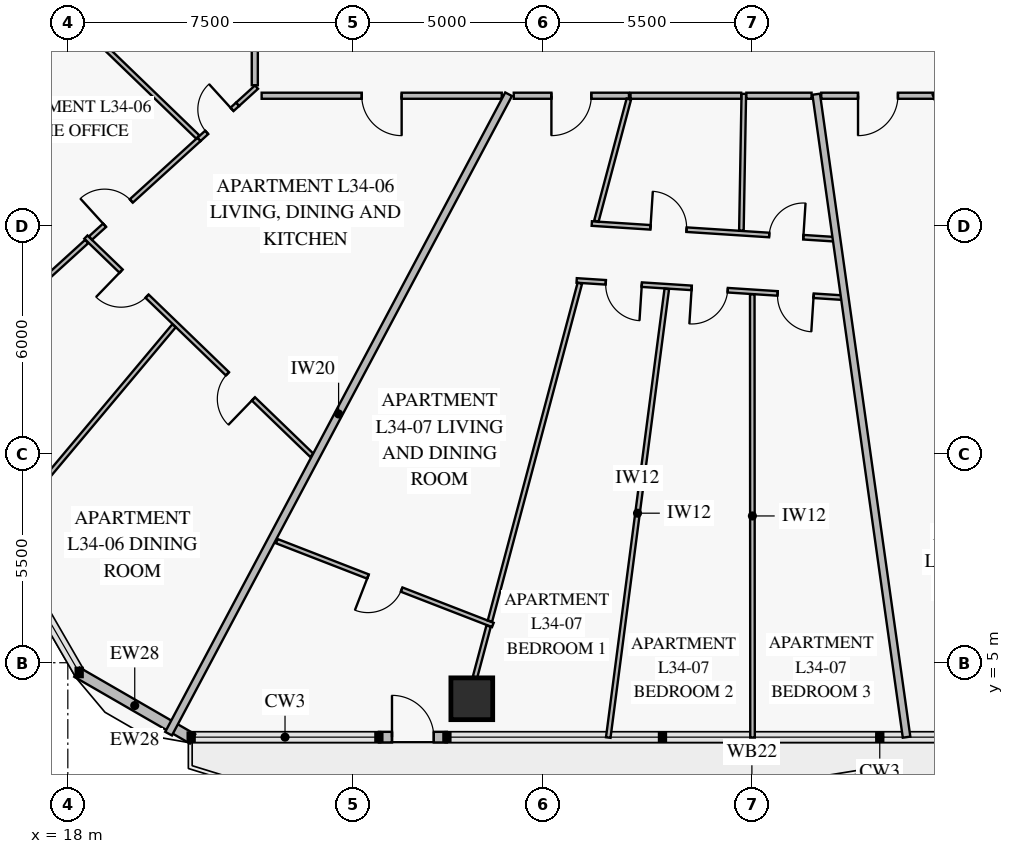
"""IFC4 building model, lengths in metres.
Left out: names, types, materials, properties, quantities, classifications, styles, units other than length and angle.
Written with IfcOpenShell. Run it as: python <this file> out.ifc"""

import sys

from ifc_helpers import new_model, si_unit, direction, frame, frame_2d, origin, origin_2d, place, context, subcontext, project, spatial, rectangle, extrude, element, fill, save


model = new_model("IFC4")
c1 = context("Model", 3, precision=1e-05, world=origin(), true_north=direction((0.0, 1.0)))
c2 = subcontext(c1, "Body", "Model", "MODEL_VIEW")
j1 = project(units=[si_unit("LENGTHUNIT", "METRE"), si_unit("PLANEANGLEUNIT", "RADIAN")], contexts=[c1])
p1 = place(None, origin())
s1 = spatial("IfcSite", under=j1, at=p1, CompositionType="ELEMENT")
p2 = place(p1, origin())
s2 = spatial("IfcBuilding", under=s1, at=p2, CompositionType="ELEMENT")
p3 = place(p2, frame((0.0, 0.0, 138.0)))
s3 = spatial("IfcBuildingStorey", under=s2, at=p3, CompositionType="ELEMENT", Elevation=138.0)
p4 = place(p3, frame((28.63, 4.052, 0.0), z_axis=(0.0, 0.0, 1.0), x_axis=(1.0, 0.0, 0.0)))
e1 = element("IfcColumn", 1, at=p4, inside=s3, PredefinedType="COLUMN", context=c2, shape_type="SweptSolid", body=[
    extrude(rectangle(XDim=1.1, YDim=1.1, at=origin_2d()), origin(), (0.0, 0.0, 1.0), 3.55),
])
p5 = place(p3, frame((27.975, 3.042, 0.0), z_axis=(0.0, 0.0, 1.0), x_axis=(-1.0, 0.0, 0.0)))
e2 = element("IfcWall", 2, at=p5, inside=s3, PredefinedType="SOLIDWALL", context=c2, shape_type="SweptSolid", body=[
    extrude(rectangle(XDim=1.79, YDim=0.28, at=frame_2d((0.895, 0.0))), origin(), (0.0, 0.0, 1.0), 3.55),
])
p6 = place(p5, frame((0.345, 0.0, 0.0)))
e3 = element("IfcOpeningElement", 3, at=p6, cuts=e2, PredefinedType="OPENING", context=c2, shape_type="SweptSolid", body=[
    extrude(rectangle(XDim=1.1, YDim=2.2, at=frame_2d((0.55, 1.1))), frame((0.0, 0.152, 0.0), z_axis=(0.0, -1.0, 0.0), x_axis=(1.0, 0.0, 0.0)), (0.0, 0.0, 1.0), 0.304),
])
p7 = place(p3, frame((21.283, 2.994, 0.0), z_axis=(0.0, 0.0, 1.0), x_axis=(-0.866007452331, 0.500031091541, 0.0)))
e4 = element("IfcWall", 4, at=p7, inside=s3, PredefinedType="SOLIDWALL", context=c2, shape_type="SweptSolid", body=[
    extrude(rectangle(XDim=3.515, YDim=0.28, at=frame_2d((1.757, 0.0))), origin(), (0.0, 0.0, 1.0), 3.55),
])
p8 = place(p3, frame((18.475, 16.2, 0.0), z_axis=(0.0, 0.0, 1.0), x_axis=(0.719335270824, -0.694663060878, 0.0)))
e5 = element("IfcWall", 5, at=p8, inside=s3, PredefinedType="PARTITIONING", context=c2, shape_type="SweptSolid", body=[
    extrude(rectangle(XDim=8.263, YDim=0.12, at=frame_2d((4.131, 0.0))), origin(), (0.0, 0.0, 1.0), 2.85),
])
p9 = place(p8, frame((1.288, 0.0, 0.0)))
e6 = element("IfcOpeningElement", 6, at=p9, cuts=e5, PredefinedType="OPENING", context=c2, shape_type="SweptSolid", body=[
    extrude(rectangle(XDim=0.95, YDim=2.1, at=frame_2d((0.475, 1.05))), frame((0.0, 0.072, 0.0), z_axis=(0.0, -1.0, 0.0), x_axis=(1.0, 0.0, 0.0)), (0.0, 0.0, 1.0), 0.144),
])
p10 = place(p8, frame((5.179, 0.0, 0.0)))
e7 = element("IfcOpeningElement", 7, at=p10, cuts=e5, PredefinedType="OPENING", context=c2, shape_type="SweptSolid", body=[
    extrude(rectangle(XDim=0.95, YDim=2.1, at=frame_2d((0.475, 1.05))), frame((0.0, 0.072, 0.0), z_axis=(0.0, -1.0, 0.0), x_axis=(1.0, 0.0, 0.0)), (0.0, 0.0, 1.0), 0.144),
])
p11 = place(p3, frame((22.469, 19.696, 0.0), z_axis=(0.0, 0.0, 1.0), x_axis=(-0.739835725611, -0.672787558677, 0.0)))
e8 = element("IfcWall", 8, at=p11, inside=s3, PredefinedType="PARTITIONING", context=c2, shape_type="SweptSolid", body=[
    extrude(rectangle(XDim=1.376, YDim=0.12, at=frame_2d((0.688, 0.0))), origin(), (0.0, 0.0, 1.0), 3.55),
])
p12 = place(p11, frame((0.2, 0.0, 0.0)))
e9 = element("IfcOpeningElement", 9, at=p12, cuts=e8, PredefinedType="OPENING", context=c2, shape_type="SweptSolid", body=[
    extrude(rectangle(XDim=0.9, YDim=2.1, at=frame_2d((0.45, 1.05))), frame((0.0, 0.072, 0.0), z_axis=(0.0, -1.0, 0.0), x_axis=(1.0, 0.0, 0.0)), (0.0, 0.0, 1.0), 0.144),
])
p13 = place(p3, frame((21.45, 18.77, 0.0), z_axis=(0.0, 0.0, 1.0), x_axis=(-0.739899959551, -0.672716916583, 0.0)))
e10 = element("IfcWall", 10, at=p13, inside=s3, PredefinedType="PARTITIONING", context=c2, shape_type="SweptSolid", body=[
    extrude(rectangle(XDim=3.856, YDim=0.12, at=frame_2d((1.928, 0.0))), origin(), (0.0, 0.0, 1.0), 3.1),
])
p14 = place(p13, frame((2.406, 0.0, 0.0)))
e11 = element("IfcOpeningElement", 11, at=p14, cuts=e10, PredefinedType="OPENING", context=c2, shape_type="SweptSolid", body=[
    extrude(rectangle(XDim=0.95, YDim=2.1, at=frame_2d((0.475, 1.05))), frame((0.0, 0.072, 0.0), z_axis=(0.0, -1.0, 0.0), x_axis=(1.0, 0.0, 0.0)), (0.0, 0.0, 1.0), 0.144),
])
p15 = place(p3, frame((18.497, 16.084, 0.0), z_axis=(0.0, 0.0, 1.0), x_axis=(-0.739855068129, -0.672766287922, 0.0)))
e12 = element("IfcWall", 12, at=p15, inside=s3, PredefinedType="PARTITIONING", context=c2, shape_type="SweptSolid", body=[
    extrude(rectangle(XDim=1.82, YDim=0.12, at=frame_2d((0.91, 0.0))), origin(), (0.0, 0.0, 1.0), 3.55),
])
p16 = place(p3, frame((23.1, 19.92, 0.0), z_axis=(0.0, 0.0, 1.0), x_axis=(1.0, 0.0, 0.0)))
e13 = element("IfcWall", 13, at=p16, inside=s3, PredefinedType="PARTITIONING", context=c2, shape_type="SweptSolid", body=[
    extrude(rectangle(XDim=6.318, YDim=0.16, at=frame_2d((3.159, 0.0))), origin(), (0.0, 0.0, 1.0), 2.85),
])
p17 = place(p16, frame((2.634, 0.0, 0.0)))
e14 = element("IfcOpeningElement", 14, at=p17, cuts=e13, PredefinedType="OPENING", context=c2, shape_type="SweptSolid", body=[
    extrude(rectangle(XDim=1.05, YDim=2.15, at=frame_2d((0.525, 1.075))), frame((0.0, 0.092, 0.0), z_axis=(0.0, -1.0, 0.0), x_axis=(1.0, 0.0, 0.0)), (0.0, 0.0, 1.0), 0.184),
])
p18 = place(p3, frame((23.498, 8.199, 0.0), z_axis=(0.0, 0.0, 1.0), x_axis=(0.932323578893, -0.361625143262, 0.0)))
e15 = element("IfcWall", 15, at=p18, inside=s3, PredefinedType="PARTITIONING", context=c2, shape_type="SweptSolid", body=[
    extrude(rectangle(XDim=6.099, YDim=0.12, at=frame_2d((3.05, 0.0))), origin(), (0.0, 0.0, 1.0), 2.85),
])
p19 = place(p18, frame((2.574, 0.0, 0.0)))
e16 = element("IfcOpeningElement", 16, at=p19, cuts=e15, PredefinedType="OPENING", context=c2, shape_type="SweptSolid", body=[
    extrude(rectangle(XDim=0.95, YDim=2.1, at=frame_2d((0.475, 1.05))), frame((0.0, 0.072, 0.0), z_axis=(0.0, -1.0, 0.0), x_axis=(1.0, 0.0, 0.0)), (0.0, 0.0, 1.0), 0.144),
])
p20 = place(p3, frame((31.788, 16.557, 0.0), z_axis=(0.0, 0.0, 1.0), x_axis=(0.997916701545, -0.064515554547, 0.0)))
e17 = element("IfcWall", 17, at=p20, inside=s3, PredefinedType="PARTITIONING", context=c2, shape_type="SweptSolid", body=[
    extrude(rectangle(XDim=6.414, YDim=0.12, at=frame_2d((3.207, 0.0))), origin(), (0.0, 0.0, 1.0), 2.85),
])
p21 = place(p20, frame((1.548, 0.0, 0.0)))
e18 = element("IfcOpeningElement", 18, at=p21, cuts=e17, PredefinedType="OPENING", context=c2, shape_type="SweptSolid", body=[
    extrude(rectangle(XDim=0.95, YDim=2.1, at=frame_2d((0.475, 1.05))), frame((0.0, 0.072, 0.0), z_axis=(0.0, -1.0, 0.0), x_axis=(1.0, 0.0, 0.0)), (0.0, 0.0, 1.0), 0.144),
])
p22 = place(p20, frame((4.678, 0.0, 0.0)))
e19 = element("IfcOpeningElement", 19, at=p22, cuts=e17, PredefinedType="OPENING", context=c2, shape_type="SweptSolid", body=[
    extrude(rectangle(XDim=0.9, YDim=2.1, at=frame_2d((0.45, 1.05))), frame((0.0, 0.072, 0.0), z_axis=(0.0, -1.0, 0.0), x_axis=(1.0, 0.0, 0.0)), (0.0, 0.0, 1.0), 0.144),
])
p23 = place(p3, frame((31.389, 15.06, 0.0), z_axis=(0.0, 0.0, 1.0), x_axis=(0.997916790239, -0.064514182617, 0.0)))
e20 = element("IfcWall", 20, at=p23, inside=s3, PredefinedType="PARTITIONING", context=c2, shape_type="SweptSolid", body=[
    extrude(rectangle(XDim=7.016, YDim=0.12, at=frame_2d((3.508, 0.0))), origin(), (0.0, 0.0, 1.0), 2.85),
])
p24 = place(p23, frame((0.768, 0.0, 0.0)))
e21 = element("IfcOpeningElement", 21, at=p24, cuts=e20, PredefinedType="OPENING", context=c2, shape_type="SweptSolid", body=[
    extrude(rectangle(XDim=0.95, YDim=2.1, at=frame_2d((0.475, 1.05))), frame((0.0, 0.072, 0.0), z_axis=(0.0, -1.0, 0.0), x_axis=(1.0, 0.0, 0.0)), (0.0, 0.0, 1.0), 0.144),
])
p25 = place(p23, frame((3.033, 0.0, 0.0)))
e22 = element("IfcOpeningElement", 22, at=p25, cuts=e20, PredefinedType="OPENING", context=c2, shape_type="SweptSolid", body=[
    extrude(rectangle(XDim=0.95, YDim=2.1, at=frame_2d((0.475, 1.05))), frame((0.0, 0.072, 0.0), z_axis=(0.0, -1.0, 0.0), x_axis=(1.0, 0.0, 0.0)), (0.0, 0.0, 1.0), 0.144),
])
p26 = place(p23, frame((5.298, 0.0, 0.0)))
e23 = element("IfcOpeningElement", 23, at=p26, cuts=e20, PredefinedType="OPENING", context=c2, shape_type="SweptSolid", body=[
    extrude(rectangle(XDim=0.95, YDim=2.1, at=frame_2d((0.475, 1.05))), frame((0.0, 0.072, 0.0), z_axis=(0.0, -1.0, 0.0), x_axis=(1.0, 0.0, 0.0)), (0.0, 0.0, 1.0), 0.144),
])
p27 = place(p3, frame((29.734, 19.92, 0.0), z_axis=(0.0, 0.0, 1.0), x_axis=(1.0, 0.0, 0.0)))
e24 = element("IfcWall", 24, at=p27, inside=s3, PredefinedType="PARTITIONING", context=c2, shape_type="SweptSolid", body=[
    extrude(rectangle(XDim=3.031, YDim=0.16, at=frame_2d((1.516, 0.0))), origin(), (0.0, 0.0, 1.0), 2.85),
])
p28 = place(p27, frame((0.99, 0.0, 0.0)))
e25 = element("IfcOpeningElement", 25, at=p28, cuts=e24, PredefinedType="OPENING", context=c2, shape_type="SweptSolid", body=[
    extrude(rectangle(XDim=1.05, YDim=2.15, at=frame_2d((0.525, 1.075))), frame((0.0, 0.092, 0.0), z_axis=(0.0, -1.0, 0.0), x_axis=(1.0, 0.0, 0.0)), (0.0, 0.0, 1.0), 0.184),
])
p29 = place(p3, frame((37.826, 19.92, 0.0), z_axis=(0.0, 0.0, 1.0), x_axis=(1.0, 0.0, 0.0)))
e26 = element("IfcWall", 26, at=p29, inside=s3, PredefinedType="PARTITIONING", context=c2, shape_type="SweptSolid", body=[
    extrude(rectangle(XDim=2.984, YDim=0.16, at=frame_2d((1.492, 0.0))), origin(), (0.0, 0.0, 1.0), 2.85),
])
p30 = place(p29, frame((0.967, 0.0, 0.0)))
e27 = element("IfcOpeningElement", 27, at=p30, cuts=e26, PredefinedType="OPENING", context=c2, shape_type="SweptSolid", body=[
    extrude(rectangle(XDim=1.05, YDim=2.15, at=frame_2d((0.525, 1.075))), frame((0.0, 0.092, 0.0), z_axis=(0.0, -1.0, 0.0), x_axis=(1.0, 0.0, 0.0)), (0.0, 0.0, 1.0), 0.184),
])
p31 = place(p3, frame((22.96, 24.471, 0.0), z_axis=(0.0, 0.0, 1.0), x_axis=(-0.866023267778, -0.500003699654, 0.0)))
e28 = element("IfcWall", 28, at=p31, inside=s3, PredefinedType="PARTITIONING", context=c2, shape_type="SweptSolid", body=[
    extrude(rectangle(XDim=13.901, YDim=0.2, at=frame_2d((6.951, 0.0))), origin(), (0.0, 0.0, 1.0), 2.8),
])
p32 = place(p3, frame((20.794, 13.866, 0.0), z_axis=(0.0, 0.0, 1.0), x_axis=(-0.642520269692, -0.766268688539, 0.0)))
e29 = element("IfcWall", 29, at=p32, inside=s3, PredefinedType="PARTITIONING", context=c2, shape_type="SweptSolid", body=[
    extrude(rectangle(XDim=7.187, YDim=0.12, at=frame_2d((3.594, 0.0))), origin(), (0.0, 0.0, 1.0), 2.8),
])
p33 = place(p3, frame((22.965, 20.147, 0.0), z_axis=(0.0, 0.0, 1.0), x_axis=(-0.739791864243, -0.67283578799, 0.0)))
e30 = element("IfcWall", 30, at=p33, inside=s3, PredefinedType="PARTITIONING", context=c2, shape_type="SweptSolid", body=[
    extrude(rectangle(XDim=0.671, YDim=0.12, at=frame_2d((0.335, 0.0))), origin(), (0.0, 0.0, 1.0), 3.55),
])
p34 = place(p3, frame((18.424, 21.728, 0.0), z_axis=(0.0, 0.0, 1.0), x_axis=(0.719336822734, -0.694661453845, 0.0)))
e31 = element("IfcWall", 31, at=p34, inside=s3, PredefinedType="PARTITIONING", context=c2, shape_type="SweptSolid", body=[
    extrude(rectangle(XDim=4.166, YDim=0.12, at=frame_2d((2.083, 0.0))), origin(), (0.0, 0.0, 1.0), 3.55),
])
p35 = place(p3, frame((29.598, 19.96, 0.0), z_axis=(0.0, 0.0, 1.0), x_axis=(-0.469467427619, -0.882949791554, 0.0)))
e32 = element("IfcWall", 32, at=p35, inside=s3, PredefinedType="PARTITIONING", context=c2, shape_type="SweptSolid", body=[
    extrude(rectangle(XDim=19.057, YDim=0.2, at=frame_2d((9.528, 0.0))), origin(), (0.0, 0.0, 1.0), 2.8),
])
p36 = place(p3, frame((35.788, 19.97, 0.0), z_axis=(0.0, 0.0, 1.0), x_axis=(-0.017701743617, -0.999843311861, 0.0)))
e33 = element("IfcWall", 33, at=p36, inside=s3, PredefinedType="PARTITIONING", context=c2, shape_type="SweptSolid", body=[
    extrude(rectangle(XDim=3.6, YDim=0.12, at=frame_2d((1.8, 0.0))), origin(), (0.0, 0.0, 1.0), 3.55),
])
p37 = place(p3, frame((33.761, 14.838, 0.0), z_axis=(0.0, 0.0, 1.0), x_axis=(-0.129380382559, -0.9915950366, 0.0)))
e34 = element("IfcWall", 34, at=p37, inside=s3, PredefinedType="PARTITIONING", context=c2, shape_type="SweptSolid", body=[
    extrude(rectangle(XDim=11.907, YDim=0.12, at=frame_2d((5.954, 0.0))), origin(), (0.0, 0.0, 1.0), 2.8),
])
p38 = place(p3, frame((36.01, 14.693, 0.0), z_axis=(0.0, 0.0, 1.0), x_axis=(0.000586203186, -0.999999828183, 0.0)))
e35 = element("IfcWall", 35, at=p38, inside=s3, PredefinedType="PARTITIONING", context=c2, shape_type="SweptSolid", body=[
    extrude(rectangle(XDim=11.661, YDim=0.12, at=frame_2d((5.831, 0.0))), origin(), (0.0, 0.0, 1.0), 2.8),
])
p39 = place(p3, frame((32.762, 19.832, 0.0), z_axis=(0.0, 0.0, 1.0), x_axis=(-0.257187510329, -0.966361518548, 0.0)))
e36 = element("IfcWall", 36, at=p39, inside=s3, PredefinedType="PARTITIONING", context=c2, shape_type="SweptSolid", body=[
    extrude(rectangle(XDim=3.326, YDim=0.12, at=frame_2d((1.663, 0.0))), origin(), (0.0, 0.0, 1.0), 2.85),
])
p40 = place(p3, frame((31.473, 14.986, 0.0), z_axis=(0.0, 0.0, 1.0), x_axis=(-0.257120794916, -0.966379271726, 0.0)))
e37 = element("IfcWall", 37, at=p40, inside=s3, PredefinedType="PARTITIONING", context=c2, shape_type="SweptSolid", body=[
    extrude(rectangle(XDim=9.199, YDim=0.12, at=frame_2d((4.6, 0.0))), origin(), (0.0, 0.0, 1.0), 2.85),
])
p41 = place(p3, frame((29.073, 5.964, 0.0), z_axis=(0.0, 0.0, 1.0), x_axis=(-0.257268877058, -0.966339859934, 0.0)))
e38 = element("IfcWall", 38, at=p41, inside=s3, PredefinedType="PARTITIONING", context=c2, shape_type="SweptSolid", body=[
    extrude(rectangle(XDim=1.389, YDim=0.12, at=frame_2d((0.695, 0.0))), origin(), (0.0, 0.0, 1.0), 2.85),
])
p42 = place(p3, frame((37.692, 19.96, 0.0), z_axis=(0.0, 0.0, 1.0), x_axis=(0.139170315648, -0.990268460188, 0.0)))
e39 = element("IfcWall", 39, at=p42, inside=s3, PredefinedType="PARTITIONING", context=c2, shape_type="SweptSolid", body=[
    extrude(rectangle(XDim=17.085, YDim=0.2, at=frame_2d((8.542, 0.0))), origin(), (0.0, 0.0, 1.0), 2.8),
])
p43 = place(p3, frame((40.814, 19.963, 0.0), z_axis=(0.0, 0.0, 1.0), x_axis=(0.371581909809, -0.928400174657, 0.0)))
e40 = element("IfcWall", 40, at=p43, inside=s3, PredefinedType="PARTITIONING", context=c2, shape_type="SweptSolid", body=[
    extrude(rectangle(XDim=0.66, YDim=0.12, at=frame_2d((0.33, 0.0))), origin(), (0.0, 0.0, 1.0), 3.55),
])
p44 = place(p3, frame((22.92, 24.272, 0.0), z_axis=(0.0, 0.0, 1.0), x_axis=(0.0, -1.0, 0.0)))
e41 = element("IfcWall", 41, at=p44, inside=s3, PredefinedType="PARTITIONING", context=c2, shape_type="SweptSolid", body=[
    extrude(rectangle(XDim=4.075, YDim=0.16, at=frame_2d((2.038, 0.0))), origin(), (0.0, 0.0, 1.0), 3.55),
])
p45 = place(p3, frame((32.806, 19.92, 0.0), z_axis=(0.0, 0.0, 1.0), x_axis=(1.0, 0.0, 0.0)))
e42 = element("IfcWall", 42, at=p45, inside=s3, PredefinedType="PARTITIONING", context=c2, shape_type="SweptSolid", body=[
    extrude(rectangle(XDim=2.912, YDim=0.16, at=frame_2d((1.456, 0.0))), origin(), (0.0, 0.0, 1.0), 2.85),
])
p46 = place(p3, frame((35.854, 19.92, 0.0), z_axis=(0.0, 0.0, 1.0), x_axis=(1.0, 0.0, 0.0)))
e43 = element("IfcWall", 43, at=p46, inside=s3, PredefinedType="PARTITIONING", context=c2, shape_type="SweptSolid", body=[
    extrude(rectangle(XDim=1.716, YDim=0.16, at=frame_2d((0.858, 0.0))), origin(), (0.0, 0.0, 1.0), 3.55),
])
p47 = place(p6, frame((1.1, 0.0, 0.0), z_axis=(0.0, 0.0, 1.0), x_axis=(-1.0, 0.0, 0.0)))
e44 = element("IfcDoor", 44, at=p47, inside=s3, OperationType="SINGLE_SWING_LEFT", PredefinedType="DOOR", context=c2, shape_type="SweptSolid", body=[
    extrude(rectangle(XDim=1.1, YDim=2.2, at=frame_2d((0.55, 1.1))), frame((0.0, 0.025, 0.0), z_axis=(0.0, -1.0, 0.0), x_axis=(1.0, 0.0, 0.0)), (0.0, 0.0, 1.0), 0.05),
])
fill(e3, e44)
p48 = place(p9, frame((0.95, 0.0, 0.0), z_axis=(0.0, 0.0, 1.0), x_axis=(-1.0, 0.0, 0.0)))
e45 = element("IfcDoor", 45, at=p48, inside=s3, OperationType="SINGLE_SWING_RIGHT", PredefinedType="DOOR", context=c2, shape_type="SweptSolid", body=[
    extrude(rectangle(XDim=0.95, YDim=2.1, at=frame_2d((0.475, 1.05))), frame((0.0, 0.025, 0.0), z_axis=(0.0, -1.0, 0.0), x_axis=(1.0, 0.0, 0.0)), (0.0, 0.0, 1.0), 0.05),
])
fill(e6, e45)
p49 = place(p10, frame((0.95, 0.0, 0.0), z_axis=(0.0, 0.0, 1.0), x_axis=(-1.0, 0.0, 0.0)))
e46 = element("IfcDoor", 46, at=p49, inside=s3, OperationType="SINGLE_SWING_LEFT", PredefinedType="DOOR", context=c2, shape_type="SweptSolid", body=[
    extrude(rectangle(XDim=0.95, YDim=2.1, at=frame_2d((0.475, 1.05))), frame((0.0, 0.025, 0.0), z_axis=(0.0, -1.0, 0.0), x_axis=(1.0, 0.0, 0.0)), (0.0, 0.0, 1.0), 0.05),
])
fill(e7, e46)
p50 = place(p12, frame((0.9, 0.0, 0.0), z_axis=(0.0, 0.0, 1.0), x_axis=(-1.0, 0.0, 0.0)))
e47 = element("IfcDoor", 47, at=p50, inside=s3, OperationType="SINGLE_SWING_RIGHT", PredefinedType="DOOR", context=c2, shape_type="SweptSolid", body=[
    extrude(rectangle(XDim=0.9, YDim=2.1, at=frame_2d((0.45, 1.05))), frame((0.0, 0.025, 0.0), z_axis=(0.0, -1.0, 0.0), x_axis=(1.0, 0.0, 0.0)), (0.0, 0.0, 1.0), 0.05),
])
fill(e9, e47)
p51 = place(p14, frame((0.95, 0.0, 0.0), z_axis=(0.0, 0.0, 1.0), x_axis=(-1.0, 0.0, 0.0)))
e48 = element("IfcDoor", 48, at=p51, inside=s3, OperationType="SINGLE_SWING_LEFT", PredefinedType="DOOR", context=c2, shape_type="SweptSolid", body=[
    extrude(rectangle(XDim=0.95, YDim=2.1, at=frame_2d((0.475, 1.05))), frame((0.0, 0.025, 0.0), z_axis=(0.0, -1.0, 0.0), x_axis=(1.0, 0.0, 0.0)), (0.0, 0.0, 1.0), 0.05),
])
fill(e11, e48)
p52 = place(p17, frame((1.05, 0.0, 0.0), z_axis=(0.0, 0.0, 1.0), x_axis=(-1.0, 0.0, 0.0)))
e49 = element("IfcDoor", 49, at=p52, inside=s3, OperationType="SINGLE_SWING_LEFT", PredefinedType="DOOR", context=c2, shape_type="SweptSolid", body=[
    extrude(rectangle(XDim=1.05, YDim=2.15, at=frame_2d((0.525, 1.075))), frame((0.0, 0.025, 0.0), z_axis=(0.0, -1.0, 0.0), x_axis=(1.0, 0.0, 0.0)), (0.0, 0.0, 1.0), 0.05),
])
fill(e14, e49)
p53 = place(p19, frame((0.95, 0.0, 0.0), z_axis=(0.0, 0.0, 1.0), x_axis=(-1.0, 0.0, 0.0)))
e50 = element("IfcDoor", 50, at=p53, inside=s3, OperationType="SINGLE_SWING_RIGHT", PredefinedType="DOOR", context=c2, shape_type="SweptSolid", body=[
    extrude(rectangle(XDim=0.95, YDim=2.1, at=frame_2d((0.475, 1.05))), frame((0.0, 0.025, 0.0), z_axis=(0.0, -1.0, 0.0), x_axis=(1.0, 0.0, 0.0)), (0.0, 0.0, 1.0), 0.05),
])
fill(e16, e50)
p54 = place(p21, origin())
e51 = element("IfcDoor", 51, at=p54, inside=s3, OperationType="SINGLE_SWING_LEFT", PredefinedType="DOOR", context=c2, shape_type="SweptSolid", body=[
    extrude(rectangle(XDim=0.95, YDim=2.1, at=frame_2d((0.475, 1.05))), frame((0.0, 0.025, 0.0), z_axis=(0.0, -1.0, 0.0), x_axis=(1.0, 0.0, 0.0)), (0.0, 0.0, 1.0), 0.05),
])
fill(e18, e51)
p55 = place(p22, origin())
e52 = element("IfcDoor", 52, at=p55, inside=s3, OperationType="SINGLE_SWING_RIGHT", PredefinedType="DOOR", context=c2, shape_type="SweptSolid", body=[
    extrude(rectangle(XDim=0.9, YDim=2.1, at=frame_2d((0.45, 1.05))), frame((0.0, 0.025, 0.0), z_axis=(0.0, -1.0, 0.0), x_axis=(1.0, 0.0, 0.0)), (0.0, 0.0, 1.0), 0.05),
])
fill(e19, e52)
p56 = place(p24, frame((0.95, 0.0, 0.0), z_axis=(0.0, 0.0, 1.0), x_axis=(-1.0, 0.0, 0.0)))
e53 = element("IfcDoor", 53, at=p56, inside=s3, OperationType="SINGLE_SWING_LEFT", PredefinedType="DOOR", context=c2, shape_type="SweptSolid", body=[
    extrude(rectangle(XDim=0.95, YDim=2.1, at=frame_2d((0.475, 1.05))), frame((0.0, 0.025, 0.0), z_axis=(0.0, -1.0, 0.0), x_axis=(1.0, 0.0, 0.0)), (0.0, 0.0, 1.0), 0.05),
])
fill(e21, e53)
p57 = place(p25, frame((0.95, 0.0, 0.0), z_axis=(0.0, 0.0, 1.0), x_axis=(-1.0, 0.0, 0.0)))
e54 = element("IfcDoor", 54, at=p57, inside=s3, OperationType="SINGLE_SWING_RIGHT", PredefinedType="DOOR", context=c2, shape_type="SweptSolid", body=[
    extrude(rectangle(XDim=0.95, YDim=2.1, at=frame_2d((0.475, 1.05))), frame((0.0, 0.025, 0.0), z_axis=(0.0, -1.0, 0.0), x_axis=(1.0, 0.0, 0.0)), (0.0, 0.0, 1.0), 0.05),
])
fill(e22, e54)
p58 = place(p26, frame((0.95, 0.0, 0.0), z_axis=(0.0, 0.0, 1.0), x_axis=(-1.0, 0.0, 0.0)))
e55 = element("IfcDoor", 55, at=p58, inside=s3, OperationType="SINGLE_SWING_LEFT", PredefinedType="DOOR", context=c2, shape_type="SweptSolid", body=[
    extrude(rectangle(XDim=0.95, YDim=2.1, at=frame_2d((0.475, 1.05))), frame((0.0, 0.025, 0.0), z_axis=(0.0, -1.0, 0.0), x_axis=(1.0, 0.0, 0.0)), (0.0, 0.0, 1.0), 0.05),
])
fill(e23, e55)
p59 = place(p28, frame((1.05, 0.0, 0.0), z_axis=(0.0, 0.0, 1.0), x_axis=(-1.0, 0.0, 0.0)))
e56 = element("IfcDoor", 56, at=p59, inside=s3, OperationType="SINGLE_SWING_RIGHT", PredefinedType="DOOR", context=c2, shape_type="SweptSolid", body=[
    extrude(rectangle(XDim=1.05, YDim=2.15, at=frame_2d((0.525, 1.075))), frame((0.0, 0.025, 0.0), z_axis=(0.0, -1.0, 0.0), x_axis=(1.0, 0.0, 0.0)), (0.0, 0.0, 1.0), 0.05),
])
fill(e25, e56)
p60 = place(p30, frame((1.05, 0.0, 0.0), z_axis=(0.0, 0.0, 1.0), x_axis=(-1.0, 0.0, 0.0)))
e57 = element("IfcDoor", 57, at=p60, inside=s3, OperationType="SINGLE_SWING_RIGHT", PredefinedType="DOOR", context=c2, shape_type="SweptSolid", body=[
    extrude(rectangle(XDim=1.05, YDim=2.15, at=frame_2d((0.525, 1.075))), frame((0.0, 0.025, 0.0), z_axis=(0.0, -1.0, 0.0), x_axis=(1.0, 0.0, 0.0)), (0.0, 0.0, 1.0), 0.05),
])
fill(e27, e57)
save(model, sys.argv[1])
